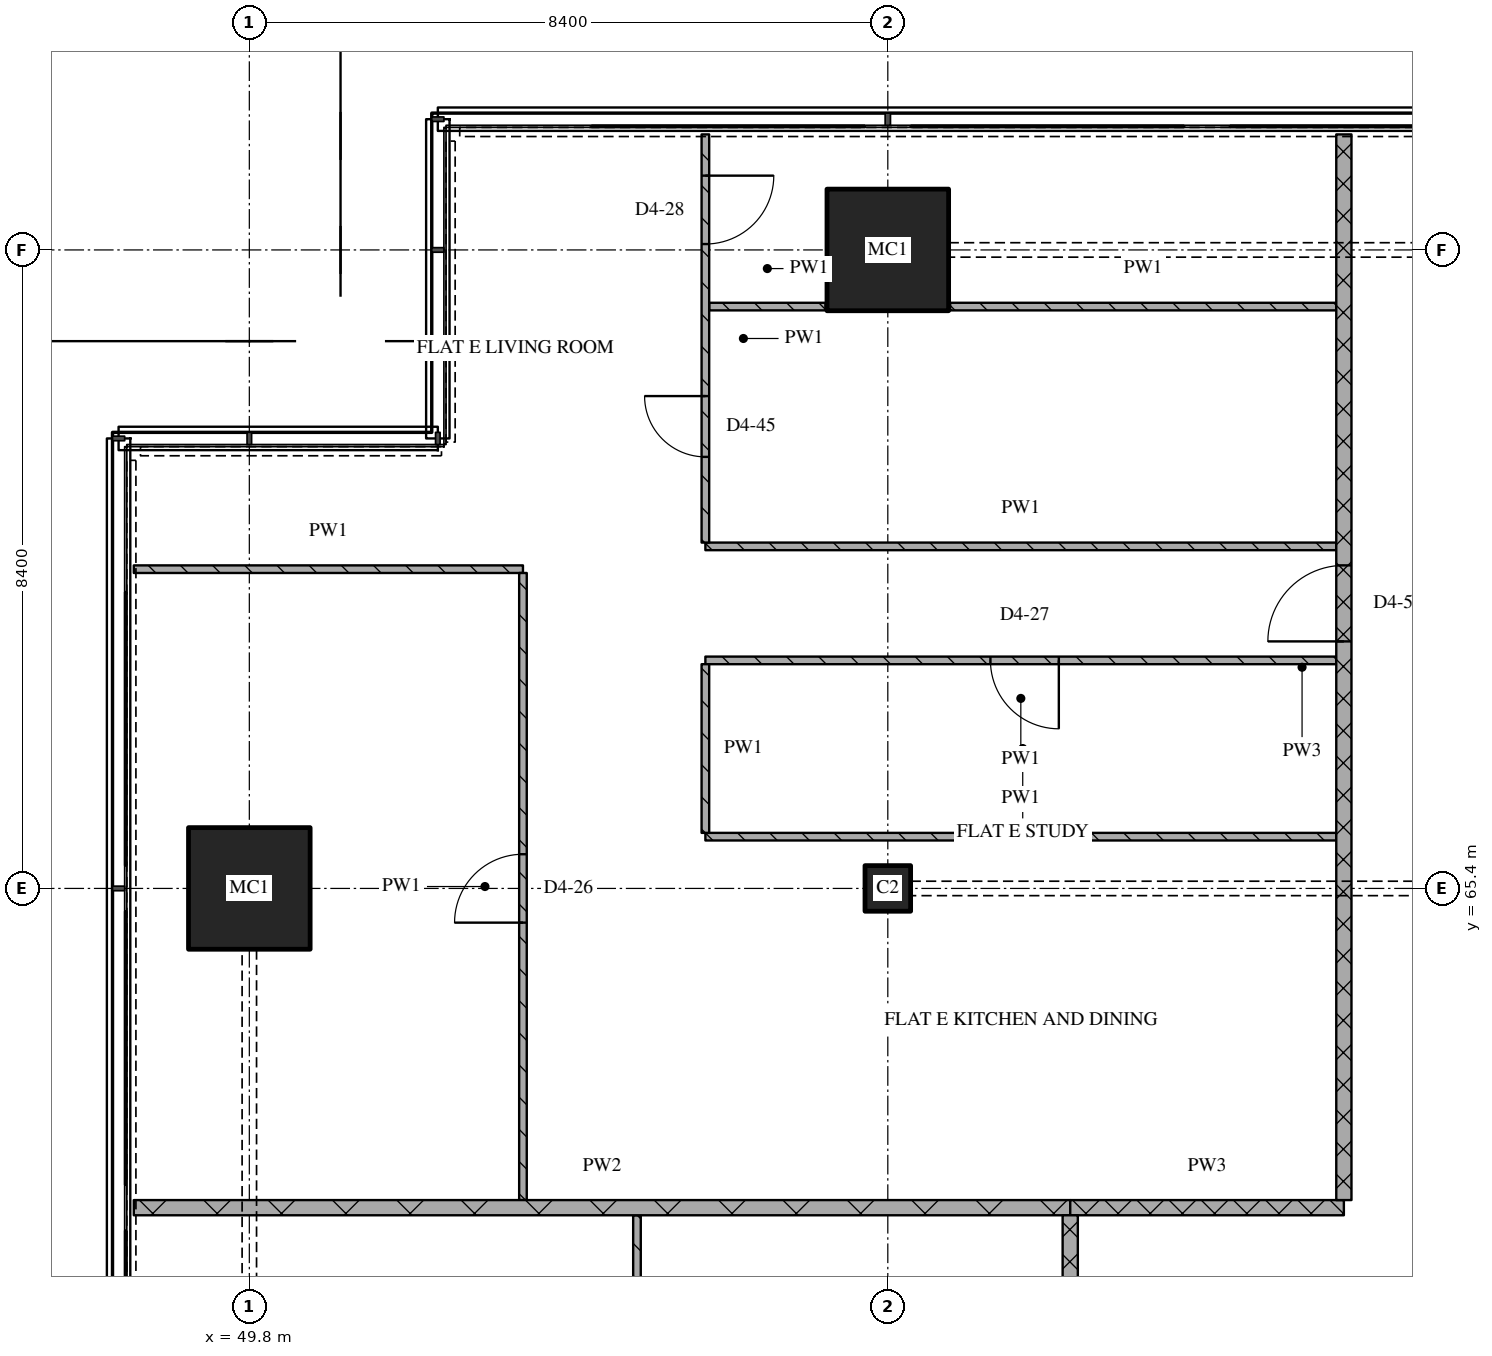
"""IFC4 building model, lengths in metres.
Left out: names, types, materials, properties, quantities, classifications, styles, units other than length and angle.
Written with IfcOpenShell. Run it as: python <this file> out.ifc"""

import sys

from ifc_helpers import new_model, si_unit, direction, frame, frame_2d, origin, origin_2d, place, context, subcontext, project, spatial, rectangle, extrude, element, fill, save


model = new_model("IFC4")
c1 = context("Model", 3, precision=1e-05, world=origin(), true_north=direction((0.0, 1.0)))
c2 = subcontext(c1, "Body", "Model", "MODEL_VIEW")
j1 = project(units=[si_unit("LENGTHUNIT", "METRE"), si_unit("PLANEANGLEUNIT", "RADIAN")], contexts=[c1])
p1 = place(None, origin())
s1 = spatial("IfcSite", under=j1, at=p1, CompositionType="ELEMENT")
p2 = place(p1, origin())
s2 = spatial("IfcBuilding", under=s1, at=p2, CompositionType="ELEMENT")
p3 = place(p2, frame((0.0, 0.0, 237.9)))
s3 = spatial("IfcBuildingStorey", under=s2, at=p3, CompositionType="ELEMENT", Elevation=237.9)
p4 = place(p3, frame((49.8, 65.4, 0.0), z_axis=(0.0, 0.0, 1.0), x_axis=(1.0, 0.0, 0.0)))
e1 = element("IfcColumn", 1, at=p4, inside=s3, PredefinedType="COLUMN", context=c2, shape_type="SweptSolid", body=[
    extrude(rectangle(XDim=1.6, YDim=1.6, at=origin_2d()), origin(), (0.0, 0.0, 1.0), 3.6),
])
p5 = place(p3, frame((58.2, 65.4, 0.0), z_axis=(0.0, 0.0, 1.0), x_axis=(1.0, 0.0, 0.0)))
e2 = element("IfcColumn", 2, at=p5, inside=s3, PredefinedType="COLUMN", context=c2, shape_type="SweptSolid", body=[
    extrude(rectangle(XDim=0.6, YDim=0.6, at=origin_2d()), origin(), (0.0, 0.0, 1.0), 3.6),
])
p6 = place(p3, frame((58.2, 73.8, 0.0), z_axis=(0.0, 0.0, 1.0), x_axis=(1.0, 0.0, 0.0)))
e3 = element("IfcColumn", 3, at=p6, inside=s3, PredefinedType="COLUMN", context=c2, shape_type="SweptSolid", body=[
    extrude(rectangle(XDim=1.6, YDim=1.6, at=origin_2d()), origin(), (0.0, 0.0, 1.0), 3.6),
])
p7 = place(p3, frame((60.6, 61.2, 0.0), z_axis=(0.0, 0.0, 1.0), x_axis=(1.0, 0.0, 0.0)))
e4 = element("IfcWall", 4, at=p7, inside=s3, PredefinedType="PARTITIONING", context=c2, shape_type="SweptSolid", body=[
    extrude(rectangle(XDim=3.6, YDim=0.2, at=frame_2d((1.8, 0.0))), origin(), (0.0, 0.0, 1.0), 3.32),
])
p8 = place(p3, frame((48.28, 61.2, 0.0), z_axis=(0.0, 0.0, 1.0), x_axis=(1.0, 0.0, 0.0)))
e5 = element("IfcWall", 5, at=p8, inside=s3, PredefinedType="PARTITIONING", context=c2, shape_type="SweptSolid", body=[
    extrude(rectangle(XDim=12.32, YDim=0.2, at=frame_2d((6.16, 0.0))), origin(), (0.0, 0.0, 1.0), 3.32),
])
p9 = place(p3, frame((55.8, 66.081, 0.0), z_axis=(0.0, 0.0, 1.0), x_axis=(1.0, 0.0, 0.0)))
e6 = element("IfcWall", 6, at=p9, inside=s3, PredefinedType="PARTITIONING", context=c2, shape_type="SweptSolid", body=[
    extrude(rectangle(XDim=8.3, YDim=0.1, at=frame_2d((4.15, 0.0))), origin(), (0.0, 0.0, 1.0), 3.32),
])
p10 = place(p3, frame((64.1, 68.4, 0.0), z_axis=(0.0, 0.0, 1.0), x_axis=(-1.0, 0.0, 0.0)))
e7 = element("IfcWall", 7, at=p10, inside=s3, PredefinedType="PARTITIONING", context=c2, shape_type="SweptSolid", body=[
    extrude(rectangle(XDim=8.3, YDim=0.1, at=frame_2d((4.15, 0.0))), origin(), (0.0, 0.0, 1.0), 3.32),
])
p11 = place(p10, frame((3.65, 0.0, 0.0)))
e8 = element("IfcOpeningElement", 8, at=p11, cuts=e7, PredefinedType="OPENING", context=c2, shape_type="SweptSolid", body=[
    extrude(rectangle(XDim=0.9, YDim=2.1, at=frame_2d((0.45, 1.05))), frame((0.0, 0.06, 0.0), z_axis=(0.0, -1.0, 0.0), x_axis=(1.0, 0.0, 0.0)), (0.0, 0.0, 1.0), 0.12),
])
p12 = place(p3, frame((48.28, 69.6, 0.0), z_axis=(0.0, 0.0, 1.0), x_axis=(1.0, 0.0, 0.0)))
e9 = element("IfcWall", 9, at=p12, inside=s3, PredefinedType="PARTITIONING", context=c2, shape_type="SweptSolid", body=[
    extrude(rectangle(XDim=5.12, YDim=0.1, at=frame_2d((2.56, 0.0))), origin(), (0.0, 0.0, 1.0), 3.32),
])
p13 = place(p3, frame((55.8, 69.9, 0.0), z_axis=(0.0, 0.0, 1.0), x_axis=(1.0, 0.0, 0.0)))
e10 = element("IfcWall", 10, at=p13, inside=s3, PredefinedType="PARTITIONING", context=c2, shape_type="SweptSolid", body=[
    extrude(rectangle(XDim=8.3, YDim=0.1, at=frame_2d((4.15, 0.0))), origin(), (0.0, 0.0, 1.0), 3.32),
])
p14 = place(p3, frame((55.85, 73.055, 0.0), z_axis=(0.0, 0.0, 1.0), x_axis=(1.0, 0.0, 0.0)))
e11 = element("IfcWall", 11, at=p14, inside=s3, PredefinedType="PARTITIONING", context=c2, shape_type="SweptSolid", body=[
    extrude(rectangle(XDim=1.53, YDim=0.1, at=frame_2d((0.765, 0.0))), origin(), (0.0, 0.0, 1.0), 3.32),
])
p15 = place(p3, frame((59.02, 73.055, 0.0), z_axis=(0.0, 0.0, 1.0), x_axis=(1.0, 0.0, 0.0)))
e12 = element("IfcWall", 12, at=p15, inside=s3, PredefinedType="PARTITIONING", context=c2, shape_type="SweptSolid", body=[
    extrude(rectangle(XDim=5.08, YDim=0.1, at=frame_2d((2.54, 0.0))), origin(), (0.0, 0.0, 1.0), 3.32),
])
p16 = place(p3, frame((53.4, 61.3, 0.0), z_axis=(0.0, 0.0, 1.0), x_axis=(0.0, 1.0, 0.0)))
e13 = element("IfcWall", 13, at=p16, inside=s3, PredefinedType="PARTITIONING", context=c2, shape_type="SweptSolid", body=[
    extrude(rectangle(XDim=8.25, YDim=0.1, at=frame_2d((4.125, 0.0))), origin(), (0.0, 0.0, 1.0), 3.32),
])
p17 = place(p16, frame((3.65, 0.0, 0.0)))
e14 = element("IfcOpeningElement", 14, at=p17, cuts=e13, PredefinedType="OPENING", context=c2, shape_type="SweptSolid", body=[
    extrude(rectangle(XDim=0.9, YDim=2.1, at=frame_2d((0.45, 1.05))), frame((0.0, 0.06, 0.0), z_axis=(0.0, -1.0, 0.0), x_axis=(1.0, 0.0, 0.0)), (0.0, 0.0, 1.0), 0.12),
])
p18 = place(p3, frame((54.9, 61.1, 0.0), z_axis=(0.0, 0.0, 1.0), x_axis=(0.0, -1.0, 0.0)))
e15 = element("IfcWall", 15, at=p18, inside=s3, PredefinedType="PARTITIONING", context=c2, shape_type="SweptSolid", body=[
    extrude(rectangle(XDim=7.65, YDim=0.1, at=frame_2d((3.825, 0.0))), origin(), (0.0, 0.0, 1.0), 3.32),
])
p19 = place(p18, frame((1.15, 0.0, 0.0)))
e16 = element("IfcOpeningElement", 16, at=p19, cuts=e15, PredefinedType="OPENING", context=c2, shape_type="SweptSolid", body=[
    extrude(rectangle(XDim=0.8, YDim=2.1, at=frame_2d((0.4, 1.05))), frame((0.0, 0.06, 0.0), z_axis=(0.0, -1.0, 0.0), x_axis=(1.0, 0.0, 0.0)), (0.0, 0.0, 1.0), 0.12),
])
p20 = place(p18, frame((5.05, 0.0, 0.0)))
e17 = element("IfcOpeningElement", 17, at=p20, cuts=e15, PredefinedType="OPENING", context=c2, shape_type="SweptSolid", body=[
    extrude(rectangle(XDim=0.8, YDim=2.1, at=frame_2d((0.4, 1.05))), frame((0.0, 0.06, 0.0), z_axis=(0.0, -1.0, 0.0), x_axis=(1.0, 0.0, 0.0)), (0.0, 0.0, 1.0), 0.12),
])
p21 = place(p3, frame((55.8, 68.35, 0.0), z_axis=(0.0, 0.0, 1.0), x_axis=(0.0, -1.0, 0.0)))
e18 = element("IfcWall", 18, at=p21, inside=s3, PredefinedType="PARTITIONING", context=c2, shape_type="SweptSolid", body=[
    extrude(rectangle(XDim=2.219, YDim=0.1, at=frame_2d((1.109, 0.0))), origin(), (0.0, 0.0, 1.0), 3.32),
])
p22 = place(p3, frame((55.8, 75.32, 0.0), z_axis=(0.0, 0.0, 1.0), x_axis=(0.0, -1.0, 0.0)))
e19 = element("IfcWall", 19, at=p22, inside=s3, PredefinedType="PARTITIONING", context=c2, shape_type="SweptSolid", body=[
    extrude(rectangle(XDim=5.37, YDim=0.1, at=frame_2d((2.685, 0.0))), origin(), (0.0, 0.0, 1.0), 3.32),
])
p23 = place(p22, frame((0.542, 0.0, 0.0)))
e20 = element("IfcOpeningElement", 20, at=p23, cuts=e19, PredefinedType="OPENING", context=c2, shape_type="SweptSolid", body=[
    extrude(rectangle(XDim=0.9, YDim=2.1, at=frame_2d((0.45, 1.05))), frame((0.0, 0.06, 0.0), z_axis=(0.0, -1.0, 0.0), x_axis=(1.0, 0.0, 0.0)), (0.0, 0.0, 1.0), 0.12),
])
p24 = place(p22, frame((3.443, 0.0, 0.0)))
e21 = element("IfcOpeningElement", 21, at=p24, cuts=e19, PredefinedType="OPENING", context=c2, shape_type="SweptSolid", body=[
    extrude(rectangle(XDim=0.8, YDim=2.1, at=frame_2d((0.4, 1.05))), frame((0.0, 0.06, 0.0), z_axis=(0.0, -1.0, 0.0), x_axis=(1.0, 0.0, 0.0)), (0.0, 0.0, 1.0), 0.12),
])
p25 = place(p3, frame((60.6, 43.3, 0.0), z_axis=(0.0, 0.0, 1.0), x_axis=(0.0, 1.0, 0.0)))
e22 = element("IfcWall", 22, at=p25, inside=s3, PredefinedType="PARTITIONING", context=c2, shape_type="SweptSolid", body=[
    extrude(rectangle(XDim=17.8, YDim=0.2, at=frame_2d((8.9, 0.0))), origin(), (0.0, 0.0, 1.0), 3.32),
])
p26 = place(p25, frame((8.85, 0.0, 0.0)))
e23 = element("IfcOpeningElement", 23, at=p26, cuts=e22, PredefinedType="OPENING", context=c2, shape_type="SweptSolid", body=[
    extrude(rectangle(XDim=1.0, YDim=2.1, at=frame_2d((0.5, 1.05))), frame((0.0, 0.11, 0.0), z_axis=(0.0, -1.0, 0.0), x_axis=(1.0, 0.0, 0.0)), (0.0, 0.0, 1.0), 0.22),
])
p27 = place(p3, frame((64.2, 61.3, 0.0), z_axis=(0.0, 0.0, 1.0), x_axis=(0.0, 1.0, 0.0)))
e24 = element("IfcWall", 24, at=p27, inside=s3, PredefinedType="PARTITIONING", context=c2, shape_type="SweptSolid", body=[
    extrude(rectangle(XDim=14.02, YDim=0.2, at=frame_2d((7.01, 0.0))), origin(), (0.0, 0.0, 1.0), 3.32),
])
p28 = place(p27, frame((7.35, 0.0, 0.0)))
e25 = element("IfcOpeningElement", 25, at=p28, cuts=e24, PredefinedType="OPENING", context=c2, shape_type="SweptSolid", body=[
    extrude(rectangle(XDim=1.0, YDim=2.1, at=frame_2d((0.5, 1.05))), frame((0.0, 0.11, 0.0), z_axis=(0.0, -1.0, 0.0), x_axis=(1.0, 0.0, 0.0)), (0.0, 0.0, 1.0), 0.22),
])
p29 = place(p11, origin())
e26 = element("IfcDoor", 26, at=p29, inside=s3, OperationType="SINGLE_SWING_LEFT", PredefinedType="DOOR", context=c2, shape_type="SweptSolid", body=[
    extrude(rectangle(XDim=0.9, YDim=2.1, at=frame_2d((0.45, 1.05))), frame((0.0, 0.025, 0.0), z_axis=(0.0, -1.0, 0.0), x_axis=(1.0, 0.0, 0.0)), (0.0, 0.0, 1.0), 0.05),
])
fill(e8, e26)
p30 = place(p17, origin())
e27 = element("IfcDoor", 27, at=p30, inside=s3, OperationType="SINGLE_SWING_LEFT", PredefinedType="DOOR", context=c2, shape_type="SweptSolid", body=[
    extrude(rectangle(XDim=0.9, YDim=2.1, at=frame_2d((0.45, 1.05))), frame((0.0, 0.025, 0.0), z_axis=(0.0, -1.0, 0.0), x_axis=(1.0, 0.0, 0.0)), (0.0, 0.0, 1.0), 0.05),
])
fill(e14, e27)
p31 = place(p23, origin())
e28 = element("IfcDoor", 28, at=p31, inside=s3, OperationType="SINGLE_SWING_LEFT", PredefinedType="DOOR", context=c2, shape_type="SweptSolid", body=[
    extrude(rectangle(XDim=0.9, YDim=2.1, at=frame_2d((0.45, 1.05))), frame((0.0, 0.025, 0.0), z_axis=(0.0, -1.0, 0.0), x_axis=(1.0, 0.0, 0.0)), (0.0, 0.0, 1.0), 0.05),
])
fill(e20, e28)
p32 = place(p24, origin())
e29 = element("IfcDoor", 29, at=p32, inside=s3, OperationType="SINGLE_SWING_RIGHT", PredefinedType="DOOR", context=c2, shape_type="SweptSolid", body=[
    extrude(rectangle(XDim=0.8, YDim=2.1, at=frame_2d((0.4, 1.05))), frame((0.0, 0.025, 0.0), z_axis=(0.0, -1.0, 0.0), x_axis=(1.0, 0.0, 0.0)), (0.0, 0.0, 1.0), 0.05),
])
fill(e21, e29)
p33 = place(p28, origin())
e30 = element("IfcDoor", 30, at=p33, inside=s3, OperationType="SINGLE_SWING_LEFT", PredefinedType="DOOR", context=c2, shape_type="SweptSolid", body=[
    extrude(rectangle(XDim=1.0, YDim=2.1, at=frame_2d((0.5, 1.05))), frame((0.0, 0.025, 0.0), z_axis=(0.0, -1.0, 0.0), x_axis=(1.0, 0.0, 0.0)), (0.0, 0.0, 1.0), 0.05),
])
fill(e25, e30)
save(model, sys.argv[1])
